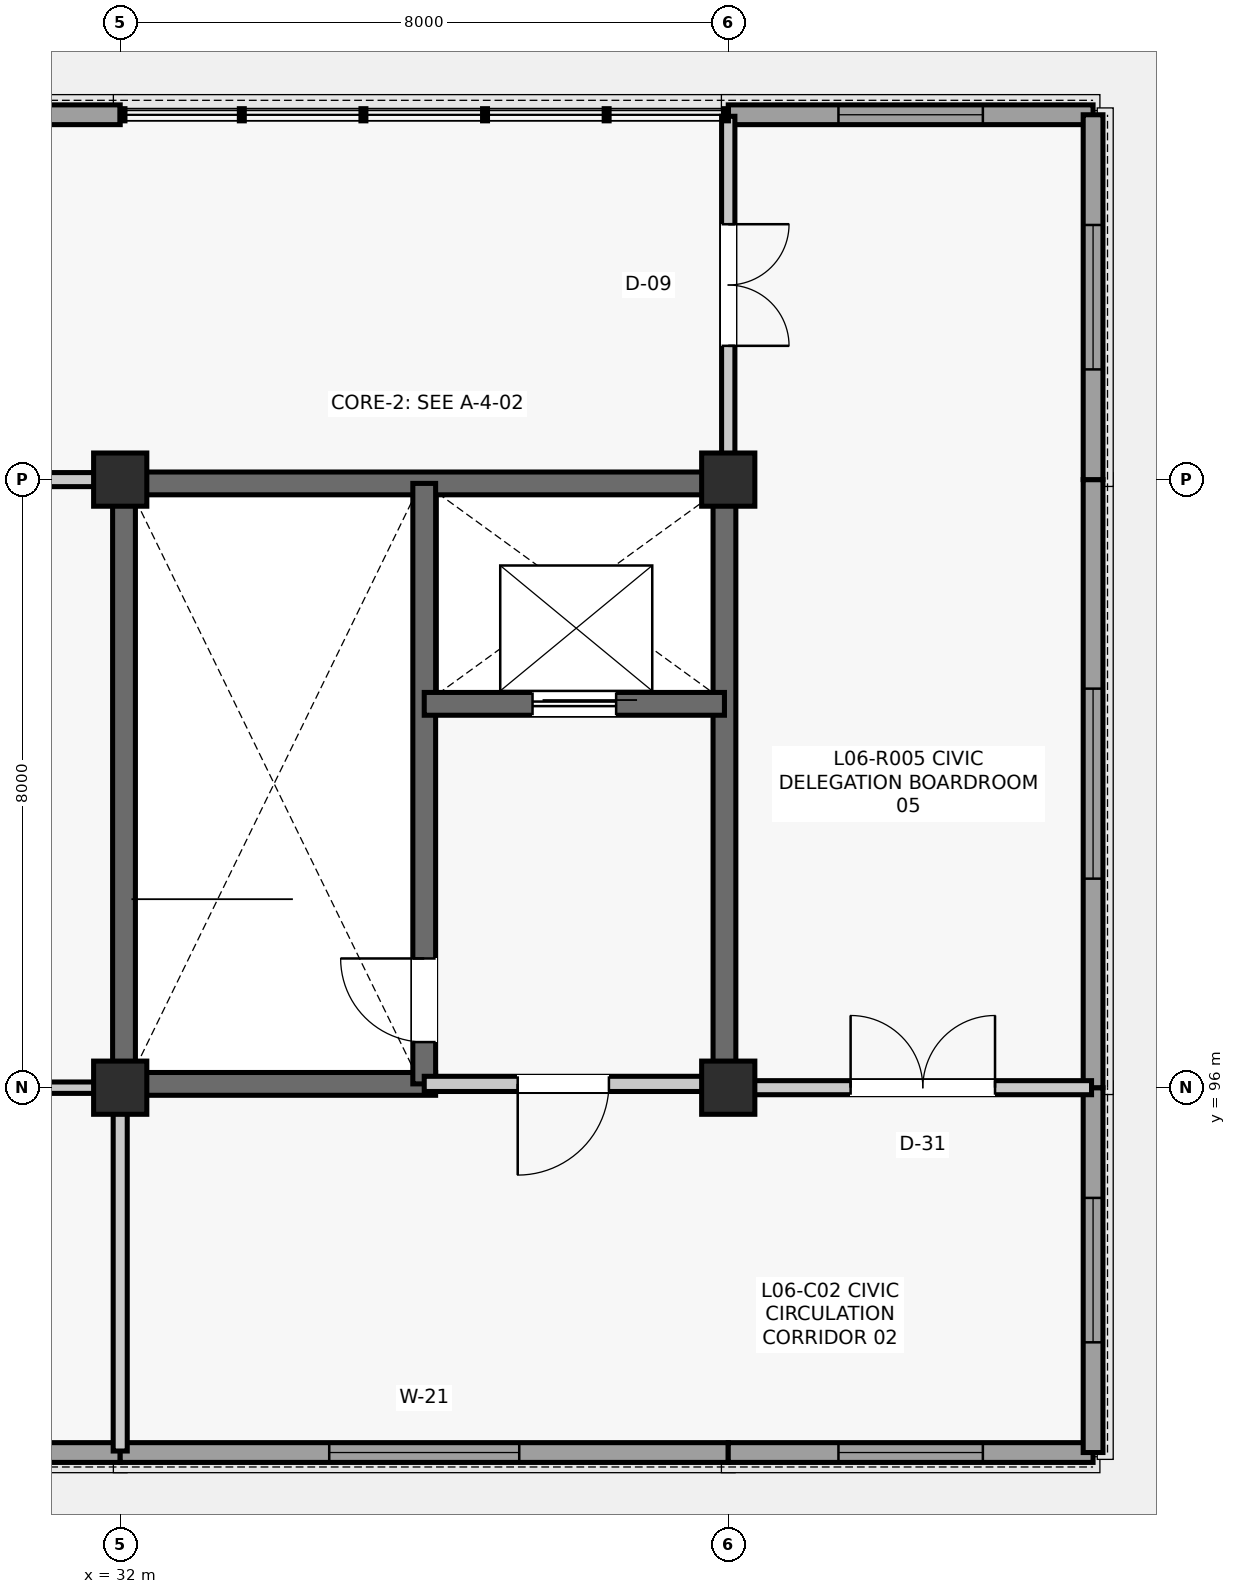
"""IFC4 building model, lengths in metres.
Left out: names, types, materials, properties, quantities, classifications, styles, units other than length and angle.
Written with IfcOpenShell. Run it as: python <this file> out.ifc"""

import sys

from ifc_helpers import new_model, si_unit, direction, frame, frame_2d, origin, origin_2d, place, context, subcontext, project, spatial, rectangle, extrude, element, fill, save


model = new_model("IFC4")
c1 = context("Model", 3, precision=1e-05, world=origin(), true_north=direction((0.0, 1.0)))
c2 = subcontext(c1, "Body", "Model", "MODEL_VIEW")
j1 = project(units=[si_unit("LENGTHUNIT", "METRE"), si_unit("PLANEANGLEUNIT", "RADIAN")], contexts=[c1])
p1 = place(None, origin())
s1 = spatial("IfcSite", under=j1, at=p1, CompositionType="ELEMENT")
p2 = place(p1, origin())
s2 = spatial("IfcBuilding", under=s1, at=p2, CompositionType="ELEMENT")
p3 = place(p2, frame((0.0, 0.0, 25.74)))
s3 = spatial("IfcBuildingStorey", under=s2, at=p3, CompositionType="ELEMENT", Elevation=25.74)
for number, where, z_axis, x_axis in (
    (1, (32.0, 96.0, 0.0), (0.0, 0.0, 1.0), (1.0, 0.0, 0.0)),
    (2, (32.0, 104.0, 0.0), (0.0, 0.0, 1.0), (1.0, 0.0, 0.0)),
    (3, (40.0, 96.0, 0.0), (0.0, 0.0, 1.0), (1.0, 0.0, 0.0)),
    (4, (40.0, 104.0, 0.0), (0.0, 0.0, 1.0), (1.0, 0.0, 0.0)),
):
    element("IfcColumn", number, at=place(p3, frame(where, z_axis=z_axis, x_axis=x_axis)), inside=s3, PredefinedType="COLUMN", context=c2, shape_type="SweptSolid", body=[
        extrude(rectangle(XDim=0.7, YDim=0.7, at=origin_2d()), origin(), (0.0, 0.0, 1.0), 4.29),
    ])
p4 = place(p3, frame((24.0, 91.2, 0.0), z_axis=(0.0, 0.0, 1.0), x_axis=(1.0, 0.0, 0.0)))
e5 = element("IfcWall", 5, at=p4, inside=s3, PredefinedType="SOLIDWALL", context=c2, shape_type="SweptSolid", body=[
    extrude(rectangle(XDim=8.0, YDim=0.26, at=frame_2d((4.0, 0.0))), origin(), (0.0, 0.0, 1.0), 4.09),
])
p5 = place(p4, frame((3.125, 0.0, 0.0)))
e6 = element("IfcOpeningElement", 6, at=p5, cuts=e5, PredefinedType="OPENING", context=c2, shape_type="SweptSolid", body=[
    extrude(rectangle(XDim=1.75, YDim=2.2, at=frame_2d((0.875, 1.1))), frame((0.0, 0.14, 0.0), z_axis=(0.0, -1.0, 0.0), x_axis=(1.0, 0.0, 0.0)), (0.0, 0.0, 1.0), 0.28),
])
p6 = place(p3, frame((32.0, 91.2, 0.0), z_axis=(0.0, 0.0, 1.0), x_axis=(1.0, 0.0, 0.0)))
e7 = element("IfcWall", 7, at=p6, inside=s3, PredefinedType="SOLIDWALL", context=c2, shape_type="SweptSolid", body=[
    extrude(rectangle(XDim=8.0, YDim=0.26, at=frame_2d((4.0, 0.0))), origin(), (0.0, 0.0, 1.0), 4.09),
])
p7 = place(p6, frame((2.75, 0.0, 0.85)))
e8 = element("IfcOpeningElement", 8, at=p7, cuts=e7, PredefinedType="OPENING", context=c2, shape_type="SweptSolid", body=[
    extrude(rectangle(XDim=2.5, YDim=2.2, at=frame_2d((1.25, 1.1))), frame((0.0, 0.14, 0.0), z_axis=(0.0, -1.0, 0.0), x_axis=(1.0, 0.0, 0.0)), (0.0, 0.0, 1.0), 0.28),
])
p8 = place(p3, frame((40.0, 91.2, 0.0), z_axis=(0.0, 0.0, 1.0), x_axis=(1.0, 0.0, 0.0)))
e9 = element("IfcWall", 9, at=p8, inside=s3, PredefinedType="SOLIDWALL", context=c2, shape_type="SweptSolid", body=[
    extrude(rectangle(XDim=4.8, YDim=0.26, at=frame_2d((2.4, 0.0))), origin(), (0.0, 0.0, 1.0), 4.09),
])
p9 = place(p8, frame((1.45, 0.0, 0.85)))
e10 = element("IfcOpeningElement", 10, at=p9, cuts=e9, PredefinedType="OPENING", context=c2, shape_type="SweptSolid", body=[
    extrude(rectangle(XDim=1.9, YDim=2.2, at=frame_2d((0.95, 1.1))), frame((0.0, 0.14, 0.0), z_axis=(0.0, -1.0, 0.0), x_axis=(1.0, 0.0, 0.0)), (0.0, 0.0, 1.0), 0.28),
])
p10 = place(p3, frame((24.0, 108.8, 0.0), z_axis=(0.0, 0.0, 1.0), x_axis=(1.0, 0.0, 0.0)))
e11 = element("IfcWall", 11, at=p10, inside=s3, PredefinedType="SOLIDWALL", context=c2, shape_type="SweptSolid", body=[
    extrude(rectangle(XDim=8.0, YDim=0.26, at=frame_2d((4.0, 0.0))), origin(), (0.0, 0.0, 1.0), 4.09),
])
p11 = place(p10, frame((2.75, 0.0, 0.85)))
e12 = element("IfcOpeningElement", 12, at=p11, cuts=e11, PredefinedType="OPENING", context=c2, shape_type="SweptSolid", body=[
    extrude(rectangle(XDim=2.5, YDim=2.2, at=frame_2d((1.25, 1.1))), frame((0.0, 0.14, 0.0), z_axis=(0.0, -1.0, 0.0), x_axis=(1.0, 0.0, 0.0)), (0.0, 0.0, 1.0), 0.28),
])
p12 = place(p3, frame((40.0, 108.8, 0.0), z_axis=(0.0, 0.0, 1.0), x_axis=(1.0, 0.0, 0.0)))
e13 = element("IfcWall", 13, at=p12, inside=s3, PredefinedType="SOLIDWALL", context=c2, shape_type="SweptSolid", body=[
    extrude(rectangle(XDim=4.8, YDim=0.26, at=frame_2d((2.4, 0.0))), origin(), (0.0, 0.0, 1.0), 4.09),
])
p13 = place(p12, frame((1.45, 0.0, 0.85)))
e14 = element("IfcOpeningElement", 14, at=p13, cuts=e13, PredefinedType="OPENING", context=c2, shape_type="SweptSolid", body=[
    extrude(rectangle(XDim=1.9, YDim=2.2, at=frame_2d((0.95, 1.1))), frame((0.0, 0.14, 0.0), z_axis=(0.0, -1.0, 0.0), x_axis=(1.0, 0.0, 0.0)), (0.0, 0.0, 1.0), 0.28),
])
p14 = place(p3, frame((44.8, 91.2, 0.0), z_axis=(0.0, 0.0, 1.0), x_axis=(0.0, 1.0, 0.0)))
e15 = element("IfcWall", 15, at=p14, inside=s3, PredefinedType="SOLIDWALL", context=c2, shape_type="SweptSolid", body=[
    extrude(rectangle(XDim=4.8, YDim=0.26, at=frame_2d((2.4, 0.0))), origin(), (0.0, 0.0, 1.0), 4.09),
])
p15 = place(p14, frame((1.45, 0.0, 0.85)))
e16 = element("IfcOpeningElement", 16, at=p15, cuts=e15, PredefinedType="OPENING", context=c2, shape_type="SweptSolid", body=[
    extrude(rectangle(XDim=1.9, YDim=2.2, at=frame_2d((0.95, 1.1))), frame((0.0, 0.14, 0.0), z_axis=(0.0, -1.0, 0.0), x_axis=(1.0, 0.0, 0.0)), (0.0, 0.0, 1.0), 0.28),
])
p16 = place(p3, frame((44.8, 96.0, 0.0), z_axis=(0.0, 0.0, 1.0), x_axis=(0.0, 1.0, 0.0)))
e17 = element("IfcWall", 17, at=p16, inside=s3, PredefinedType="SOLIDWALL", context=c2, shape_type="SweptSolid", body=[
    extrude(rectangle(XDim=8.0, YDim=0.26, at=frame_2d((4.0, 0.0))), origin(), (0.0, 0.0, 1.0), 4.09),
])
p17 = place(p16, frame((2.75, 0.0, 0.85)))
e18 = element("IfcOpeningElement", 18, at=p17, cuts=e17, PredefinedType="OPENING", context=c2, shape_type="SweptSolid", body=[
    extrude(rectangle(XDim=2.5, YDim=2.2, at=frame_2d((1.25, 1.1))), frame((0.0, 0.14, 0.0), z_axis=(0.0, -1.0, 0.0), x_axis=(1.0, 0.0, 0.0)), (0.0, 0.0, 1.0), 0.28),
])
p18 = place(p3, frame((44.8, 104.0, 0.0), z_axis=(0.0, 0.0, 1.0), x_axis=(0.0, 1.0, 0.0)))
e19 = element("IfcWall", 19, at=p18, inside=s3, PredefinedType="SOLIDWALL", context=c2, shape_type="SweptSolid", body=[
    extrude(rectangle(XDim=4.8, YDim=0.26, at=frame_2d((2.4, 0.0))), origin(), (0.0, 0.0, 1.0), 4.09),
])
p19 = place(p18, frame((1.45, 0.0, 0.85)))
e20 = element("IfcOpeningElement", 20, at=p19, cuts=e19, PredefinedType="OPENING", context=c2, shape_type="SweptSolid", body=[
    extrude(rectangle(XDim=1.9, YDim=2.2, at=frame_2d((0.95, 1.1))), frame((0.0, 0.14, 0.0), z_axis=(0.0, -1.0, 0.0), x_axis=(1.0, 0.0, 0.0)), (0.0, 0.0, 1.0), 0.28),
])
for number, where, z_axis, x_axis in (
    (21, (32.05, 96.24, 0.0), (0.0, 0.0, 1.0), (0.0, 1.0, 0.0)),
    (22, (32.24, 103.95, 0.0), (0.0, 0.0, 1.0), (1.0, 0.0, 0.0)),
    (23, (39.95, 96.24, 0.0), (0.0, 0.0, 1.0), (0.0, 1.0, 0.0)),
):
    element("IfcWall", number, at=place(p3, frame(where, z_axis=z_axis, x_axis=x_axis)), inside=s3, PredefinedType="SHEAR", context=c2, shape_type="SweptSolid", body=[
        extrude(rectangle(XDim=7.52, YDim=0.3, at=frame_2d((3.76, 0.0))), origin(), (0.0, 0.0, 1.0), 4.09),
    ])
p20 = place(p3, frame((32.24, 96.05, 0.0), z_axis=(0.0, 0.0, 1.0), x_axis=(1.0, 0.0, 0.0)))
e24 = element("IfcWall", 24, at=p20, inside=s3, PredefinedType="SHEAR", context=c2, shape_type="SweptSolid", body=[
    extrude(rectangle(XDim=3.91, YDim=0.3, at=frame_2d((1.955, 0.0))), origin(), (0.0, 0.0, 1.0), 4.09),
])
p21 = place(p3, frame((36.0, 96.05, 0.0), z_axis=(0.0, 0.0, 1.0), x_axis=(0.0, 1.0, 0.0)))
e25 = element("IfcWall", 25, at=p21, inside=s3, PredefinedType="SHEAR", context=c2, shape_type="SweptSolid", body=[
    extrude(rectangle(XDim=7.9, YDim=0.3, at=frame_2d((3.95, 0.0))), origin(), (0.0, 0.0, 1.0), 4.09),
])
p22 = place(p21, frame((0.55, 0.0, 0.0)))
e26 = element("IfcOpeningElement", 26, at=p22, cuts=e25, PredefinedType="OPENING", context=c2, shape_type="SweptSolid", body=[
    extrude(rectangle(XDim=1.1, YDim=2.15, at=frame_2d((0.55, 1.075))), frame((0.0, 0.16, 0.0), z_axis=(0.0, -1.0, 0.0), x_axis=(1.0, 0.0, 0.0)), (0.0, 0.0, 1.0), 0.32),
])
p23 = place(p3, frame((36.0, 101.05, 0.0), z_axis=(0.0, 0.0, 1.0), x_axis=(1.0, 0.0, 0.0)))
e27 = element("IfcWall", 27, at=p23, inside=s3, PredefinedType="SHEAR", context=c2, shape_type="SweptSolid", body=[
    extrude(rectangle(XDim=3.95, YDim=0.3, at=frame_2d((1.975, 0.0))), origin(), (0.0, 0.0, 1.0), 4.09),
])
p24 = place(p23, frame((1.425, 0.0, 0.0)))
e28 = element("IfcOpeningElement", 28, at=p24, cuts=e27, PredefinedType="OPENING", context=c2, shape_type="SweptSolid", body=[
    extrude(rectangle(XDim=1.1, YDim=2.2, at=frame_2d((0.55, 1.1))), frame((0.0, 0.16, 0.0), z_axis=(0.0, -1.0, 0.0), x_axis=(1.0, 0.0, 0.0)), (0.0, 0.0, 1.0), 0.32),
])
p25 = place(p3, frame((36.0, 96.05, 0.0), z_axis=(0.0, 0.0, 1.0), x_axis=(1.0, 0.0, 0.0)))
e29 = element("IfcWall", 29, at=p25, inside=s3, PredefinedType="PARTITIONING", context=c2, shape_type="SweptSolid", body=[
    extrude(rectangle(XDim=3.66, YDim=0.2, at=frame_2d((1.83, 0.0))), origin(), (0.0, 0.0, 1.0), 3.408),
])
p26 = place(p25, frame((1.23, 0.0, 0.0)))
e30 = element("IfcOpeningElement", 30, at=p26, cuts=e29, PredefinedType="OPENING", context=c2, shape_type="SweptSolid", body=[
    extrude(rectangle(XDim=1.2, YDim=2.15, at=frame_2d((0.6, 1.075))), frame((0.0, 0.11, 0.0), z_axis=(0.0, -1.0, 0.0), x_axis=(1.0, 0.0, 0.0)), (0.0, 0.0, 1.0), 0.22),
])
p27 = place(p3, frame((32.0, 91.22, 0.0), z_axis=(0.0, 0.0, 1.0), x_axis=(0.0, 1.0, 0.0)))
e31 = element("IfcWall", 31, at=p27, inside=s3, PredefinedType="PARTITIONING", context=c2, shape_type="SweptSolid", body=[
    extrude(rectangle(XDim=4.44, YDim=0.185, at=frame_2d((2.22, 0.0))), origin(), (0.0, 0.0, 1.0), 3.408),
])
p28 = place(p3, frame((24.29, 96.0, 0.0), z_axis=(0.0, 0.0, 1.0), x_axis=(1.0, 0.0, 0.0)))
e32 = element("IfcWall", 32, at=p28, inside=s3, PredefinedType="PARTITIONING", context=c2, shape_type="SweptSolid", body=[
    extrude(rectangle(XDim=7.37, YDim=0.15, at=frame_2d((3.685, 0.0))), origin(), (0.0, 0.0, 1.0), 3.408),
])
p29 = place(p3, frame((24.29, 104.0, 0.0), z_axis=(0.0, 0.0, 1.0), x_axis=(1.0, 0.0, 0.0)))
e33 = element("IfcWall", 33, at=p29, inside=s3, PredefinedType="PARTITIONING", context=c2, shape_type="SweptSolid", body=[
    extrude(rectangle(XDim=7.37, YDim=0.185, at=frame_2d((3.685, 0.0))), origin(), (0.0, 0.0, 1.0), 3.408),
])
p30 = place(p3, frame((40.0, 104.34, 0.0), z_axis=(0.0, 0.0, 1.0), x_axis=(0.0, 1.0, 0.0)))
e34 = element("IfcWall", 34, at=p30, inside=s3, PredefinedType="PARTITIONING", context=c2, shape_type="SweptSolid", body=[
    extrude(rectangle(XDim=4.44, YDim=0.175, at=frame_2d((2.22, 0.0))), origin(), (0.0, 0.0, 1.0), 3.408),
])
p31 = place(p30, frame((1.42, 0.0, 0.0)))
e35 = element("IfcOpeningElement", 35, at=p31, cuts=e34, PredefinedType="OPENING", context=c2, shape_type="SweptSolid", body=[
    extrude(rectangle(XDim=1.6, YDim=2.25, at=frame_2d((0.8, 1.125))), frame((0.0, 0.097, 0.0), z_axis=(0.0, -1.0, 0.0), x_axis=(1.0, 0.0, 0.0)), (0.0, 0.0, 1.0), 0.195),
])
p32 = place(p3, frame((40.34, 96.0, 0.0), z_axis=(0.0, 0.0, 1.0), x_axis=(1.0, 0.0, 0.0)))
e36 = element("IfcWall", 36, at=p32, inside=s3, PredefinedType="PARTITIONING", context=c2, shape_type="SweptSolid", body=[
    extrude(rectangle(XDim=4.44, YDim=0.185, at=frame_2d((2.22, 0.0))), origin(), (0.0, 0.0, 1.0), 3.408),
])
p33 = place(p32, frame((1.27, 0.0, 0.0)))
e37 = element("IfcOpeningElement", 37, at=p33, cuts=e36, PredefinedType="OPENING", context=c2, shape_type="SweptSolid", body=[
    extrude(rectangle(XDim=1.9, YDim=2.38, at=frame_2d((0.95, 1.19))), frame((0.0, 0.103, 0.0), z_axis=(0.0, -1.0, 0.0), x_axis=(1.0, 0.0, 0.0)), (0.0, 0.0, 1.0), 0.205),
])
p34 = place(p7, origin())
e38 = element("IfcWindow", 38, at=p34, inside=s3, PartitioningType="SINGLE_PANEL", PredefinedType="WINDOW", context=c2, shape_type="SweptSolid", body=[
    extrude(rectangle(XDim=2.5, YDim=2.2, at=frame_2d((1.25, 1.1))), frame((0.0, 0.03, 0.0), z_axis=(0.0, -1.0, 0.0), x_axis=(1.0, 0.0, 0.0)), (0.0, 0.0, 1.0), 0.06),
])
fill(e8, e38)
p35 = place(p9, origin())
e39 = element("IfcWindow", 39, at=p35, inside=s3, PartitioningType="SINGLE_PANEL", PredefinedType="WINDOW", context=c2, shape_type="SweptSolid", body=[
    extrude(rectangle(XDim=1.9, YDim=2.2, at=frame_2d((0.95, 1.1))), frame((0.0, 0.03, 0.0), z_axis=(0.0, -1.0, 0.0), x_axis=(1.0, 0.0, 0.0)), (0.0, 0.0, 1.0), 0.06),
])
fill(e10, e39)
p36 = place(p13, origin())
e40 = element("IfcWindow", 40, at=p36, inside=s3, PartitioningType="SINGLE_PANEL", PredefinedType="WINDOW", context=c2, shape_type="SweptSolid", body=[
    extrude(rectangle(XDim=1.9, YDim=2.2, at=frame_2d((0.95, 1.1))), frame((0.0, 0.03, 0.0), z_axis=(0.0, -1.0, 0.0), x_axis=(1.0, 0.0, 0.0)), (0.0, 0.0, 1.0), 0.06),
])
fill(e14, e40)
p37 = place(p15, origin())
e41 = element("IfcWindow", 41, at=p37, inside=s3, PartitioningType="SINGLE_PANEL", PredefinedType="WINDOW", context=c2, shape_type="SweptSolid", body=[
    extrude(rectangle(XDim=1.9, YDim=2.2, at=frame_2d((0.95, 1.1))), frame((0.0, 0.03, 0.0), z_axis=(0.0, -1.0, 0.0), x_axis=(1.0, 0.0, 0.0)), (0.0, 0.0, 1.0), 0.06),
])
fill(e16, e41)
p38 = place(p17, origin())
e42 = element("IfcWindow", 42, at=p38, inside=s3, PartitioningType="SINGLE_PANEL", PredefinedType="WINDOW", context=c2, shape_type="SweptSolid", body=[
    extrude(rectangle(XDim=2.5, YDim=2.2, at=frame_2d((1.25, 1.1))), frame((0.0, 0.03, 0.0), z_axis=(0.0, -1.0, 0.0), x_axis=(1.0, 0.0, 0.0)), (0.0, 0.0, 1.0), 0.06),
])
fill(e18, e42)
p39 = place(p19, origin())
e43 = element("IfcWindow", 43, at=p39, inside=s3, PartitioningType="SINGLE_PANEL", PredefinedType="WINDOW", context=c2, shape_type="SweptSolid", body=[
    extrude(rectangle(XDim=1.9, YDim=2.2, at=frame_2d((0.95, 1.1))), frame((0.0, 0.03, 0.0), z_axis=(0.0, -1.0, 0.0), x_axis=(1.0, 0.0, 0.0)), (0.0, 0.0, 1.0), 0.06),
])
fill(e20, e43)
p40 = place(p22, origin())
e44 = element("IfcDoor", 44, at=p40, inside=s3, OperationType="SINGLE_SWING_RIGHT", PredefinedType="DOOR", context=c2, shape_type="SweptSolid", body=[
    extrude(rectangle(XDim=1.1, YDim=2.15, at=frame_2d((0.55, 1.075))), frame((0.0, 0.025, 0.0), z_axis=(0.0, -1.0, 0.0), x_axis=(1.0, 0.0, 0.0)), (0.0, 0.0, 1.0), 0.05),
])
fill(e26, e44)
p41 = place(p24, origin())
e45 = element("IfcDoor", 45, at=p41, inside=s3, OperationType="SLIDING_TO_LEFT", PredefinedType="DOOR", context=c2, shape_type="SweptSolid", body=[
    extrude(rectangle(XDim=1.1, YDim=2.2, at=frame_2d((0.55, 1.1))), frame((0.0, 0.025, 0.0), z_axis=(0.0, -1.0, 0.0), x_axis=(1.0, 0.0, 0.0)), (0.0, 0.0, 1.0), 0.05),
])
fill(e28, e45)
p42 = place(p26, frame((1.2, 0.0, 0.0), z_axis=(0.0, 0.0, 1.0), x_axis=(-1.0, 0.0, 0.0)))
e46 = element("IfcDoor", 46, at=p42, inside=s3, OperationType="SINGLE_SWING_LEFT", PredefinedType="DOOR", context=c2, shape_type="SweptSolid", body=[
    extrude(rectangle(XDim=1.2, YDim=2.15, at=frame_2d((0.6, 1.075))), frame((0.0, 0.025, 0.0), z_axis=(0.0, -1.0, 0.0), x_axis=(1.0, 0.0, 0.0)), (0.0, 0.0, 1.0), 0.05),
])
fill(e30, e46)
p43 = place(p31, frame((1.6, 0.0, 0.0), z_axis=(0.0, 0.0, 1.0), x_axis=(-1.0, 0.0, 0.0)))
e47 = element("IfcDoor", 47, at=p43, inside=s3, OperationType="DOUBLE_DOOR_SINGLE_SWING", PredefinedType="DOOR", context=c2, shape_type="SweptSolid", body=[
    extrude(rectangle(XDim=1.6, YDim=2.25, at=frame_2d((0.8, 1.125))), frame((0.0, 0.025, 0.0), z_axis=(0.0, -1.0, 0.0), x_axis=(1.0, 0.0, 0.0)), (0.0, 0.0, 1.0), 0.05),
])
fill(e35, e47)
p44 = place(p33, origin())
e48 = element("IfcDoor", 48, at=p44, inside=s3, OperationType="DOUBLE_DOOR_SINGLE_SWING", PredefinedType="DOOR", context=c2, shape_type="SweptSolid", body=[
    extrude(rectangle(XDim=1.9, YDim=2.38, at=frame_2d((0.95, 1.19))), frame((0.0, 0.025, 0.0), z_axis=(0.0, -1.0, 0.0), x_axis=(1.0, 0.0, 0.0)), (0.0, 0.0, 1.0), 0.05),
])
fill(e37, e48)
save(model, sys.argv[1])
